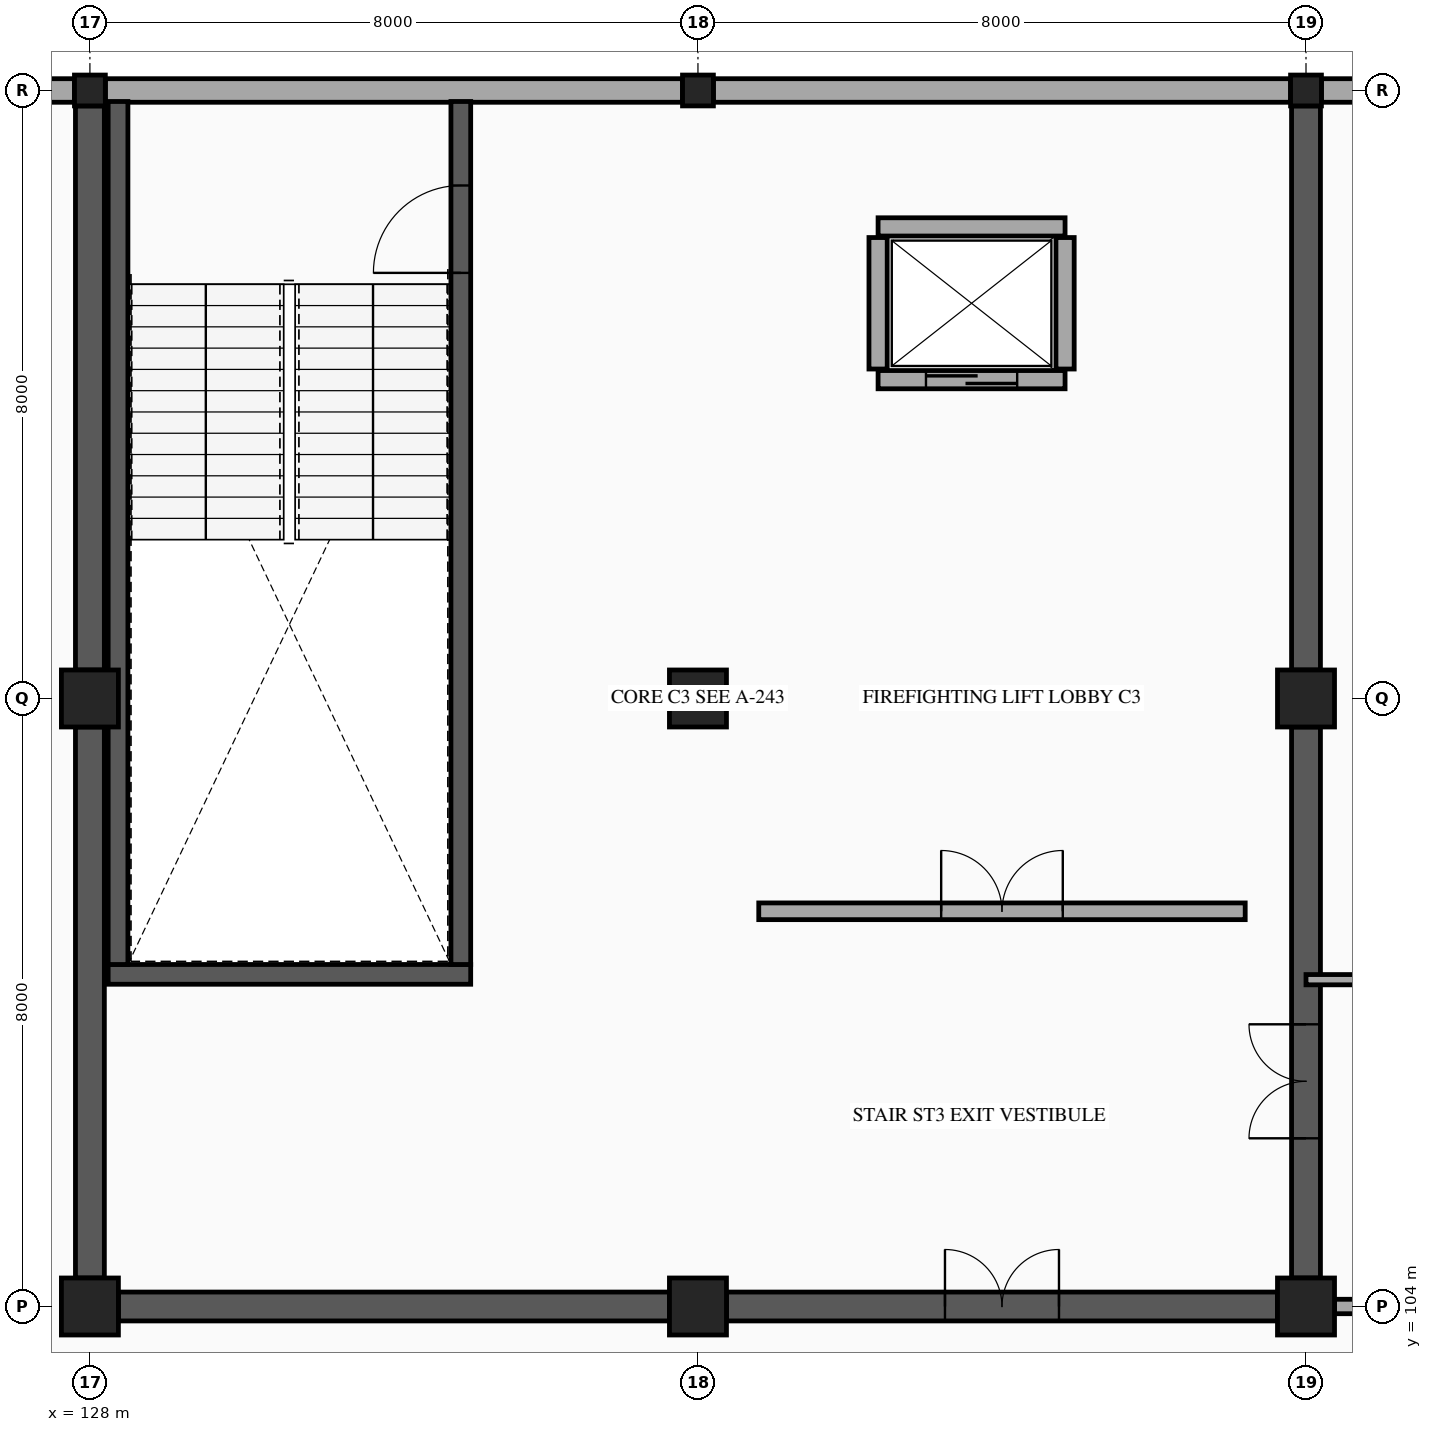
"""IFC4 building model, lengths in metres.
Left out: names, types, materials, properties, quantities, classifications, styles, units other than length and angle.
Written with IfcOpenShell. Run it as: python <this file> out.ifc"""

import sys

from ifc_helpers import new_model, si_unit, direction, frame, frame_2d, origin, origin_2d, place, context, subcontext, project, spatial, rectangle, hollow_rectangle, extrude, element, fill, save


model = new_model("IFC4")
c1 = context("Model", 3, precision=1e-05, world=origin(), true_north=direction((0.0, 1.0)))
c2 = subcontext(c1, "Body", "Model", "MODEL_VIEW")
j1 = project(units=[si_unit("LENGTHUNIT", "METRE"), si_unit("PLANEANGLEUNIT", "RADIAN")], contexts=[c1])
p1 = place(None, origin())
s1 = spatial("IfcSite", under=j1, at=p1, CompositionType="ELEMENT")
p2 = place(p1, origin())
s2 = spatial("IfcBuilding", under=s1, at=p2, CompositionType="ELEMENT")
p3 = place(p2, frame((0.0, 0.0, 14.9)))
s3 = spatial("IfcBuildingStorey", under=s2, at=p3, CompositionType="ELEMENT", Elevation=14.9)
for number, where, z_axis, x_axis in (
    (1, (128.0, 104.0, 0.0), (0.0, 0.0, 1.0), (1.0, 0.0, 0.0)),
    (2, (128.0, 112.0, 0.0), (0.0, 0.0, 1.0), (1.0, 0.0, 0.0)),
):
    element("IfcColumn", number, at=place(p3, frame(where, z_axis=z_axis, x_axis=x_axis)), inside=s3, PredefinedType="COLUMN", context=c2, shape_type="SweptSolid", body=[
        extrude(rectangle(XDim=0.75, YDim=0.75, at=origin_2d()), origin(), (0.0, 0.0, 1.0), 4.5),
    ])
p4 = place(p3, frame((128.0, 120.0, 0.0), z_axis=(0.0, 0.0, 1.0), x_axis=(1.0, 0.0, 0.0)))
e3 = element("IfcColumn", 3, at=p4, inside=s3, PredefinedType="COLUMN", context=c2, shape_type="SweptSolid", body=[
    extrude(hollow_rectangle(XDim=0.406, YDim=0.406, WallThickness=0.015, InnerFilletRadius=0.015, OuterFilletRadius=0.029, at=origin_2d()), origin(), (0.0, 0.0, 1.0), 4.5),
])
for number, where, z_axis, x_axis in (
    (4, (136.0, 104.0, 0.0), (0.0, 0.0, 1.0), (1.0, 0.0, 0.0)),
    (5, (136.0, 112.0, 0.0), (0.0, 0.0, 1.0), (1.0, 0.0, 0.0)),
):
    element("IfcColumn", number, at=place(p3, frame(where, z_axis=z_axis, x_axis=x_axis)), inside=s3, PredefinedType="COLUMN", context=c2, shape_type="SweptSolid", body=[
        extrude(rectangle(XDim=0.75, YDim=0.75, at=origin_2d()), origin(), (0.0, 0.0, 1.0), 4.5),
    ])
p5 = place(p3, frame((136.0, 120.0, 0.0), z_axis=(0.0, 0.0, 1.0), x_axis=(1.0, 0.0, 0.0)))
e6 = element("IfcColumn", 6, at=p5, inside=s3, PredefinedType="COLUMN", context=c2, shape_type="SweptSolid", body=[
    extrude(hollow_rectangle(XDim=0.406, YDim=0.406, WallThickness=0.015, InnerFilletRadius=0.015, OuterFilletRadius=0.029, at=origin_2d()), origin(), (0.0, 0.0, 1.0), 4.5),
])
for number, where, z_axis, x_axis in (
    (7, (144.0, 104.0, 0.0), (0.0, 0.0, 1.0), (1.0, 0.0, 0.0)),
    (8, (144.0, 112.0, 0.0), (0.0, 0.0, 1.0), (1.0, 0.0, 0.0)),
):
    element("IfcColumn", number, at=place(p3, frame(where, z_axis=z_axis, x_axis=x_axis)), inside=s3, PredefinedType="COLUMN", context=c2, shape_type="SweptSolid", body=[
        extrude(rectangle(XDim=0.75, YDim=0.75, at=origin_2d()), origin(), (0.0, 0.0, 1.0), 4.5),
    ])
p6 = place(p3, frame((144.0, 120.0, 0.0), z_axis=(0.0, 0.0, 1.0), x_axis=(1.0, 0.0, 0.0)))
e9 = element("IfcColumn", 9, at=p6, inside=s3, PredefinedType="COLUMN", context=c2, shape_type="SweptSolid", body=[
    extrude(hollow_rectangle(XDim=0.406, YDim=0.406, WallThickness=0.015, InnerFilletRadius=0.015, OuterFilletRadius=0.029, at=origin_2d()), origin(), (0.0, 0.0, 1.0), 4.5),
])
p7 = place(p3, frame((120.178, 120.0, 0.0), z_axis=(0.0, 0.0, 1.0), x_axis=(1.0, 0.0, 0.0)))
e10 = element("IfcWall", 10, at=p7, inside=s3, PredefinedType="STANDARD", context=c2, shape_type="SweptSolid", body=[
    extrude(rectangle(XDim=7.619, YDim=0.31, at=frame_2d((3.81, 0.0))), origin(), (0.0, 0.0, 1.0), 3.48),
])
p8 = place(p7, frame((2.984, 0.0, 0.8)))
e11 = element("IfcOpeningElement", 11, at=p8, cuts=e10, PredefinedType="OPENING", context=c2, shape_type="SweptSolid", body=[
    extrude(rectangle(XDim=1.65, YDim=2.3, at=frame_2d((0.825, 1.15))), frame((0.0, 0.165, 0.0), z_axis=(0.0, -1.0, 0.0), x_axis=(1.0, 0.0, 0.0)), (0.0, 0.0, 1.0), 0.33),
])
for number, where, z_axis, x_axis in (
    (12, (128.203, 120.0, 0.0), (0.0, 0.0, 1.0), (1.0, 0.0, 0.0)),
    (13, (136.203, 120.0, 0.0), (0.0, 0.0, 1.0), (1.0, 0.0, 0.0)),
):
    element("IfcWall", number, at=place(p3, frame(where, z_axis=z_axis, x_axis=x_axis)), inside=s3, PredefinedType="STANDARD", context=c2, shape_type="SweptSolid", body=[
        extrude(rectangle(XDim=7.594, YDim=0.31, at=frame_2d((3.797, 0.0))), origin(), (0.0, 0.0, 1.0), 3.48),
    ])
p9 = place(p3, frame((144.203, 120.0, 0.0), z_axis=(0.0, 0.0, 1.0), x_axis=(1.0, 0.0, 0.0)))
e14 = element("IfcWall", 14, at=p9, inside=s3, PredefinedType="STANDARD", context=c2, shape_type="SweptSolid", body=[
    extrude(rectangle(XDim=7.594, YDim=0.31, at=frame_2d((3.797, 0.0))), origin(), (0.0, 0.0, 1.0), 3.48),
])
p10 = place(p9, frame((2.972, 0.0, 0.8)))
e15 = element("IfcOpeningElement", 15, at=p10, cuts=e14, PredefinedType="OPENING", context=c2, shape_type="SweptSolid", body=[
    extrude(rectangle(XDim=1.65, YDim=2.3, at=frame_2d((0.825, 1.15))), frame((0.0, 0.165, 0.0), z_axis=(0.0, -1.0, 0.0), x_axis=(1.0, 0.0, 0.0)), (0.0, 0.0, 1.0), 0.33),
])
p11 = place(p3, frame((128.24, 108.37, 0.0), z_axis=(0.0, 0.0, 1.0), x_axis=(1.0, 0.0, 0.0)))
e16 = element("IfcWall", 16, at=p11, inside=s3, PredefinedType="SHEAR", context=c2, shape_type="SweptSolid", body=[
    extrude(rectangle(XDim=4.77, YDim=0.26, at=frame_2d((2.385, 0.0))), origin(), (0.0, 0.0, 1.0), 4.28),
])
p12 = place(p3, frame((128.37, 108.5, 0.0), z_axis=(0.0, 0.0, 1.0), x_axis=(0.0, 1.0, 0.0)))
e17 = element("IfcWall", 17, at=p12, inside=s3, PredefinedType="SHEAR", context=c2, shape_type="SweptSolid", body=[
    extrude(rectangle(XDim=11.355, YDim=0.26, at=frame_2d((5.677, 0.0))), origin(), (0.0, 0.0, 1.0), 4.28),
])
p13 = place(p3, frame((132.88, 108.5, 0.0), z_axis=(0.0, 0.0, 1.0), x_axis=(0.0, 1.0, 0.0)))
e18 = element("IfcWall", 18, at=p13, inside=s3, PredefinedType="SHEAR", context=c2, shape_type="SweptSolid", body=[
    extrude(rectangle(XDim=11.355, YDim=0.26, at=frame_2d((5.677, 0.0))), origin(), (0.0, 0.0, 1.0), 4.28),
])
p14 = place(p13, frame((9.1, 0.0, 0.0)))
e19 = element("IfcOpeningElement", 19, at=p14, cuts=e18, PredefinedType="OPENING", context=c2, shape_type="SweptSolid", body=[
    extrude(rectangle(XDim=1.15, YDim=2.15, at=frame_2d((0.575, 1.075))), frame((0.0, 0.14, 0.0), z_axis=(0.0, -1.0, 0.0), x_axis=(1.0, 0.0, 0.0)), (0.0, 0.0, 1.0), 0.28),
])
p15 = place(p3, frame((128.375, 104.0, 0.0), z_axis=(0.0, 0.0, 1.0), x_axis=(1.0, 0.0, 0.0)))
e20 = element("IfcWall", 20, at=p15, inside=s3, PredefinedType="SHEAR", context=c2, shape_type="SweptSolid", body=[
    extrude(rectangle(XDim=7.25, YDim=0.38, at=frame_2d((3.625, 0.0))), origin(), (0.0, 0.0, 1.0), 4.28),
])
p16 = place(p3, frame((136.375, 104.0, 0.0), z_axis=(0.0, 0.0, 1.0), x_axis=(1.0, 0.0, 0.0)))
e21 = element("IfcWall", 21, at=p16, inside=s3, PredefinedType="SHEAR", context=c2, shape_type="SweptSolid", body=[
    extrude(rectangle(XDim=7.25, YDim=0.38, at=frame_2d((3.625, 0.0))), origin(), (0.0, 0.0, 1.0), 4.28),
])
p17 = place(p16, frame((2.875, 0.0, 0.0)))
e22 = element("IfcOpeningElement", 22, at=p17, cuts=e21, PredefinedType="OPENING", context=c2, shape_type="SweptSolid", body=[
    extrude(rectangle(XDim=1.5, YDim=2.15, at=frame_2d((0.75, 1.075))), frame((0.0, 0.2, 0.0), z_axis=(0.0, -1.0, 0.0), x_axis=(1.0, 0.0, 0.0)), (0.0, 0.0, 1.0), 0.4),
])
p18 = place(p3, frame((128.0, 104.375, 0.0), z_axis=(0.0, 0.0, 1.0), x_axis=(0.0, 1.0, 0.0)))
e23 = element("IfcWall", 23, at=p18, inside=s3, PredefinedType="SHEAR", context=c2, shape_type="SweptSolid", body=[
    extrude(rectangle(XDim=7.25, YDim=0.38, at=frame_2d((3.625, 0.0))), origin(), (0.0, 0.0, 1.0), 4.28),
])
p19 = place(p3, frame((128.0, 112.375, 0.0), z_axis=(0.0, 0.0, 1.0), x_axis=(0.0, 1.0, 0.0)))
e24 = element("IfcWall", 24, at=p19, inside=s3, PredefinedType="SHEAR", context=c2, shape_type="SweptSolid", body=[
    extrude(rectangle(XDim=7.422, YDim=0.38, at=frame_2d((3.711, 0.0))), origin(), (0.0, 0.0, 1.0), 4.28),
])
p20 = place(p3, frame((144.0, 104.375, 0.0), z_axis=(0.0, 0.0, 1.0), x_axis=(0.0, 1.0, 0.0)))
e25 = element("IfcWall", 25, at=p20, inside=s3, PredefinedType="SHEAR", context=c2, shape_type="SweptSolid", body=[
    extrude(rectangle(XDim=7.25, YDim=0.38, at=frame_2d((3.625, 0.0))), origin(), (0.0, 0.0, 1.0), 4.28),
])
p21 = place(p20, frame((1.838, 0.0, 0.0)))
e26 = element("IfcOpeningElement", 26, at=p21, cuts=e25, PredefinedType="OPENING", context=c2, shape_type="SweptSolid", body=[
    extrude(rectangle(XDim=1.5, YDim=2.15, at=frame_2d((0.75, 1.075))), frame((0.0, 0.2, 0.0), z_axis=(0.0, -1.0, 0.0), x_axis=(1.0, 0.0, 0.0)), (0.0, 0.0, 1.0), 0.4),
])
p22 = place(p3, frame((144.0, 112.375, 0.0), z_axis=(0.0, 0.0, 1.0), x_axis=(0.0, 1.0, 0.0)))
e27 = element("IfcWall", 27, at=p22, inside=s3, PredefinedType="SHEAR", context=c2, shape_type="SweptSolid", body=[
    extrude(rectangle(XDim=7.422, YDim=0.38, at=frame_2d((3.711, 0.0))), origin(), (0.0, 0.0, 1.0), 4.28),
])
p23 = place(p3, frame((138.37, 116.195, 0.0), z_axis=(0.0, 0.0, 1.0), x_axis=(1.0, 0.0, 0.0)))
e28 = element("IfcWall", 28, at=p23, inside=s3, PredefinedType="PARTITIONING", context=c2, shape_type="SweptSolid", body=[
    extrude(rectangle(XDim=2.46, YDim=0.24, at=frame_2d((1.23, 0.0))), origin(), (0.0, 0.0, 1.0), 4.28),
])
p24 = place(p23, frame((0.63, 0.0, 0.0)))
e29 = element("IfcOpeningElement", 29, at=p24, cuts=e28, PredefinedType="OPENING", context=c2, shape_type="SweptSolid", body=[
    extrude(rectangle(XDim=1.2, YDim=2.15, at=frame_2d((0.6, 1.075))), frame((0.0, 0.13, 0.0), z_axis=(0.0, -1.0, 0.0), x_axis=(1.0, 0.0, 0.0)), (0.0, 0.0, 1.0), 0.26),
])
p25 = place(p3, frame((138.37, 118.205, 0.0), z_axis=(0.0, 0.0, 1.0), x_axis=(1.0, 0.0, 0.0)))
e30 = element("IfcWall", 30, at=p25, inside=s3, PredefinedType="PARTITIONING", context=c2, shape_type="SweptSolid", body=[
    extrude(rectangle(XDim=2.46, YDim=0.24, at=frame_2d((1.23, 0.0))), origin(), (0.0, 0.0, 1.0), 4.28),
])
for number, where, z_axis, x_axis in (
    (31, (138.37, 116.335, 0.0), (0.0, 0.0, 1.0), (0.0, 1.0, 0.0)),
    (32, (140.83, 116.335, 0.0), (0.0, 0.0, 1.0), (0.0, 1.0, 0.0)),
):
    element("IfcWall", number, at=place(p3, frame(where, z_axis=z_axis, x_axis=x_axis)), inside=s3, PredefinedType="PARTITIONING", context=c2, shape_type="SweptSolid", body=[
        extrude(rectangle(XDim=1.73, YDim=0.24, at=frame_2d((0.865, 0.0))), origin(), (0.0, 0.0, 1.0), 4.28),
    ])
p26 = place(p3, frame((136.8, 109.2, 0.0), z_axis=(0.0, 0.0, 1.0), x_axis=(1.0, 0.0, 0.0)))
e33 = element("IfcWall", 33, at=p26, inside=s3, PredefinedType="PARTITIONING", context=c2, shape_type="SweptSolid", body=[
    extrude(rectangle(XDim=6.4, YDim=0.22, at=frame_2d((3.2, 0.0))), origin(), (0.0, 0.0, 1.0), 3.48),
])
p27 = place(p26, frame((2.4, 0.0, 0.0)))
e34 = element("IfcOpeningElement", 34, at=p27, cuts=e33, PredefinedType="OPENING", context=c2, shape_type="SweptSolid", body=[
    extrude(rectangle(XDim=1.6, YDim=2.15, at=frame_2d((0.8, 1.075))), frame((0.0, 0.12, 0.0), z_axis=(0.0, -1.0, 0.0), x_axis=(1.0, 0.0, 0.0)), (0.0, 0.0, 1.0), 0.24),
])
p28 = place(p3, frame((144.375, 104.0, 0.0), z_axis=(0.0, 0.0, 1.0), x_axis=(1.0, 0.0, 0.0)))
e35 = element("IfcWall", 35, at=p28, inside=s3, PredefinedType="PARTITIONING", context=c2, shape_type="SweptSolid", body=[
    extrude(rectangle(XDim=3.025, YDim=0.19, at=frame_2d((1.512, 0.0))), origin(), (0.0, 0.0, 1.0), 3.48),
])
p29 = place(p3, frame((144.0, 108.3, 0.0), z_axis=(0.0, 0.0, 1.0), x_axis=(1.0, 0.0, 0.0)))
e36 = element("IfcWall", 36, at=p29, inside=s3, PredefinedType="PARTITIONING", context=c2, shape_type="SweptSolid", body=[
    extrude(rectangle(XDim=31.85, YDim=0.135, at=frame_2d((15.925, 0.0))), origin(), (0.0, 0.0, 1.0), 3.48),
])
p30 = place(p29, frame((27.485, 0.0, 0.0)))
e37 = element("IfcOpeningElement", 37, at=p30, cuts=e36, PredefinedType="OPENING", context=c2, shape_type="SweptSolid", body=[
    extrude(rectangle(XDim=1.0, YDim=2.15, at=frame_2d((0.5, 1.075))), frame((0.0, 0.077, 0.0), z_axis=(0.0, -1.0, 0.0), x_axis=(1.0, 0.0, 0.0)), (0.0, 0.0, 1.0), 0.155),
])
p31 = place(p14, origin())
e38 = element("IfcDoor", 38, at=p31, inside=s3, OperationType="SINGLE_SWING_LEFT", PredefinedType="DOOR", context=c2, shape_type="SweptSolid", body=[
    extrude(rectangle(XDim=1.15, YDim=2.15, at=frame_2d((0.575, 1.075))), frame((0.0, 0.025, 0.0), z_axis=(0.0, -1.0, 0.0), x_axis=(1.0, 0.0, 0.0)), (0.0, 0.0, 1.0), 0.05),
])
fill(e19, e38)
p32 = place(p17, origin())
e39 = element("IfcDoor", 39, at=p32, inside=s3, OperationType="DOUBLE_DOOR_SINGLE_SWING", PredefinedType="DOOR", context=c2, shape_type="SweptSolid", body=[
    extrude(rectangle(XDim=1.5, YDim=2.15, at=frame_2d((0.75, 1.075))), frame((0.0, 0.025, 0.0), z_axis=(0.0, -1.0, 0.0), x_axis=(1.0, 0.0, 0.0)), (0.0, 0.0, 1.0), 0.05),
])
fill(e22, e39)
p33 = place(p21, origin())
e40 = element("IfcDoor", 40, at=p33, inside=s3, OperationType="DOUBLE_DOOR_SINGLE_SWING", PredefinedType="DOOR", context=c2, shape_type="SweptSolid", body=[
    extrude(rectangle(XDim=1.5, YDim=2.15, at=frame_2d((0.75, 1.075))), frame((0.0, 0.025, 0.0), z_axis=(0.0, -1.0, 0.0), x_axis=(1.0, 0.0, 0.0)), (0.0, 0.0, 1.0), 0.05),
])
fill(e26, e40)
p34 = place(p24, origin())
e41 = element("IfcDoor", 41, at=p34, inside=s3, OperationType="SLIDING_TO_LEFT", PredefinedType="DOOR", context=c2, shape_type="SweptSolid", body=[
    extrude(rectangle(XDim=1.2, YDim=2.15, at=frame_2d((0.6, 1.075))), frame((0.0, 0.025, 0.0), z_axis=(0.0, -1.0, 0.0), x_axis=(1.0, 0.0, 0.0)), (0.0, 0.0, 1.0), 0.05),
])
fill(e29, e41)
p35 = place(p27, origin())
e42 = element("IfcDoor", 42, at=p35, inside=s3, OperationType="DOUBLE_DOOR_SINGLE_SWING", PredefinedType="DOOR", context=c2, shape_type="SweptSolid", body=[
    extrude(rectangle(XDim=1.6, YDim=2.15, at=frame_2d((0.8, 1.075))), frame((0.0, 0.025, 0.0), z_axis=(0.0, -1.0, 0.0), x_axis=(1.0, 0.0, 0.0)), (0.0, 0.0, 1.0), 0.05),
])
fill(e34, e42)
save(model, sys.argv[1])
